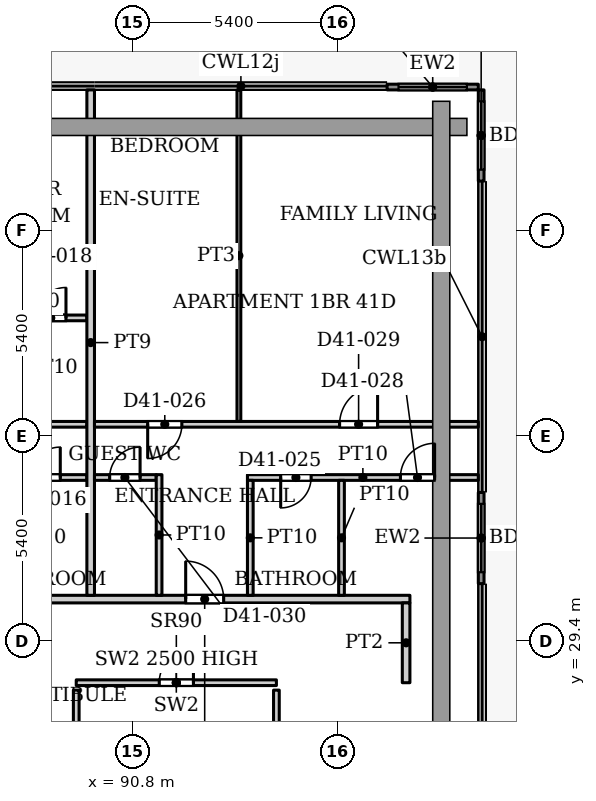
"""IFC4 building model, lengths in metres.
Left out: names, types, materials, properties, quantities, classifications, styles, units other than length and angle.
Written with IfcOpenShell. Run it as: python <this file> out.ifc"""

import sys

from ifc_helpers import new_model, si_unit, direction, frame, frame_2d, origin, place, context, subcontext, project, spatial, rectangle, extrude, source, transform, mapped, element, fill, save


model = new_model("IFC4")
c1 = context("Model", 3, precision=1e-05, world=origin(), true_north=direction((0.0, 1.0)))
c2 = subcontext(c1, "Body", "Model", "MODEL_VIEW")
j1 = project(units=[si_unit("LENGTHUNIT", "METRE"), si_unit("PLANEANGLEUNIT", "RADIAN")], contexts=[c1])
p1 = place(None, origin())
s1 = spatial("IfcSite", under=j1, at=p1, CompositionType="ELEMENT")
p2 = place(p1, origin())
s2 = spatial("IfcBuilding", under=s1, at=p2, CompositionType="ELEMENT")
p3 = place(p2, frame((0.0, 0.0, 176.0)))
s3 = spatial("IfcBuildingStorey", under=s2, at=p3, CompositionType="ELEMENT", Elevation=176.0)
p4 = place(p3, frame((97.5, 43.975, 0.0), z_axis=(0.0, 0.0, 1.0), x_axis=(1.0, 0.0, 0.0)))
e1 = element("IfcWall", 1, at=p4, inside=s3, PredefinedType="SOLIDWALL", context=c2, shape_type="SweptSolid", body=[
    extrude(rectangle(XDim=2.4, YDim=0.15, at=frame_2d((1.2, 0.0))), origin(), (0.0, 0.0, 1.0), 3.75),
])
p5 = place(p4, frame((0.3, 0.0, 0.0)))
e2 = element("IfcOpeningElement", 2, at=p5, cuts=e1, PredefinedType="OPENING", context=c2, shape_type="SweptSolid", body=[
    extrude(rectangle(XDim=1.8, YDim=2.4, at=frame_2d((0.9, 1.2))), frame((0.0, 0.085, 0.0), z_axis=(0.0, -1.0, 0.0), x_axis=(1.0, 0.0, 0.0)), (0.0, 0.0, 1.0), 0.17),
])
p6 = place(p3, frame((99.975, 43.9, 0.0), z_axis=(0.0, 0.0, 1.0), x_axis=(0.0, -1.0, 0.0)))
e3 = element("IfcWall", 3, at=p6, inside=s3, PredefinedType="SOLIDWALL", context=c2, shape_type="SweptSolid", body=[
    extrude(rectangle(XDim=2.4, YDim=0.15, at=frame_2d((1.2, 0.0))), origin(), (0.0, 0.0, 1.0), 3.75),
])
p7 = place(p6, frame((0.3, 0.0, 0.0)))
e4 = element("IfcOpeningElement", 4, at=p7, cuts=e3, PredefinedType="OPENING", context=c2, shape_type="SweptSolid", body=[
    extrude(rectangle(XDim=1.8, YDim=2.4, at=frame_2d((0.9, 1.2))), frame((0.0, 0.085, 0.0), z_axis=(0.0, -1.0, 0.0), x_axis=(1.0, 0.0, 0.0)), (0.0, 0.0, 1.0), 0.17),
])
p8 = place(p3, frame((99.975, 33.307, 0.0), z_axis=(0.0, 0.0, 1.0), x_axis=(0.0, -1.0, 0.0)))
e5 = element("IfcWall", 5, at=p8, inside=s3, PredefinedType="SOLIDWALL", context=c2, shape_type="SweptSolid", body=[
    extrude(rectangle(XDim=2.4, YDim=0.15, at=frame_2d((1.2, 0.0))), origin(), (0.0, 0.0, 1.0), 3.75),
])
p9 = place(p8, frame((0.3, 0.0, 0.0)))
e6 = element("IfcOpeningElement", 6, at=p9, cuts=e5, PredefinedType="OPENING", context=c2, shape_type="SweptSolid", body=[
    extrude(rectangle(XDim=1.8, YDim=2.4, at=frame_2d((0.9, 1.2))), frame((0.0, 0.085, 0.0), z_axis=(0.0, -1.0, 0.0), x_axis=(1.0, 0.0, 0.0)), (0.0, 0.0, 1.0), 0.17),
])
p10 = place(p3, frame((89.32, 28.3, 0.0), z_axis=(0.0, 0.0, 1.0), x_axis=(1.0, 0.0, 0.0)))
e7 = element("IfcWall", 7, at=p10, inside=s3, PredefinedType="PARTITIONING", context=c2, shape_type="SweptSolid", body=[
    extrude(rectangle(XDim=5.267, YDim=0.15, at=frame_2d((2.633, 0.0))), origin(), (0.0, 0.0, 1.0), 2.5),
])
p11 = place(p10, frame((2.184, 0.0, 0.0)))
e8 = element("IfcOpeningElement", 8, at=p11, cuts=e7, PredefinedType="OPENING", context=c2, shape_type="SweptSolid", body=[
    extrude(rectangle(XDim=0.9, YDim=2.2, at=frame_2d((0.45, 1.1))), frame((0.0, 0.085, 0.0), z_axis=(0.0, -1.0, 0.0), x_axis=(1.0, 0.0, 0.0)), (0.0, 0.0, 1.0), 0.17),
])
p12 = place(p3, frame((89.32, 25.62, 0.0), z_axis=(0.0, 0.0, 1.0), x_axis=(0.0, 1.0, 0.0)))
e9 = element("IfcWall", 9, at=p12, inside=s3, PredefinedType="PARTITIONING", context=c2, shape_type="SweptSolid", body=[
    extrude(rectangle(XDim=2.485, YDim=0.15, at=frame_2d((1.242, 0.0))), origin(), (0.0, 0.0, 1.0), 3.9),
])
p13 = place(p3, frame((94.587, 21.293, 0.0), z_axis=(0.0, 0.0, 1.0), x_axis=(0.0, 1.0, 0.0)))
e10 = element("IfcWall", 10, at=p13, inside=s3, PredefinedType="PARTITIONING", context=c2, shape_type="SweptSolid", body=[
    extrude(rectangle(XDim=6.812, YDim=0.15, at=frame_2d((3.406, 0.0))), origin(), (0.0, 0.0, 1.0), 3.9),
])
p14 = place(p3, frame((53.549, 30.5, 0.0), z_axis=(0.0, 0.0, 1.0), x_axis=(1.0, 0.0, 0.0)))
e11 = element("IfcWall", 11, at=p14, inside=s3, PredefinedType="PARTITIONING", context=c2, shape_type="SweptSolid", body=[
    extrude(rectangle(XDim=44.551, YDim=0.2, at=frame_2d((22.275, 0.0))), origin(), (0.0, 0.0, 1.0), 3.6),
])
p15 = place(p14, frame((6.851, 0.0, 0.0)))
e12 = element("IfcOpeningElement", 12, at=p15, cuts=e11, PredefinedType="OPENING", context=c2, shape_type="SweptSolid", body=[
    extrude(rectangle(XDim=1.0, YDim=2.1, at=frame_2d((0.5, 1.05))), frame((0.0, 0.11, 0.0), z_axis=(0.0, -1.0, 0.0), x_axis=(1.0, 0.0, 0.0)), (0.0, 0.0, 1.0), 0.22),
])
p16 = place(p14, frame((13.451, 0.0, 0.0)))
e13 = element("IfcOpeningElement", 13, at=p16, cuts=e11, PredefinedType="OPENING", context=c2, shape_type="SweptSolid", body=[
    extrude(rectangle(XDim=1.0, YDim=2.1, at=frame_2d((0.5, 1.05))), frame((0.0, 0.11, 0.0), z_axis=(0.0, -1.0, 0.0), x_axis=(1.0, 0.0, 0.0)), (0.0, 0.0, 1.0), 0.22),
])
p17 = place(p14, frame((24.701, 0.0, 0.0)))
e14 = element("IfcOpeningElement", 14, at=p17, cuts=e11, PredefinedType="OPENING", context=c2, shape_type="SweptSolid", body=[
    extrude(rectangle(XDim=1.0, YDim=2.1, at=frame_2d((0.5, 1.05))), frame((0.0, 0.11, 0.0), z_axis=(0.0, -1.0, 0.0), x_axis=(1.0, 0.0, 0.0)), (0.0, 0.0, 1.0), 0.22),
])
p18 = place(p14, frame((38.651, 0.0, 0.0)))
e15 = element("IfcOpeningElement", 15, at=p18, cuts=e11, PredefinedType="OPENING", context=c2, shape_type="SweptSolid", body=[
    extrude(rectangle(XDim=1.0, YDim=2.1, at=frame_2d((0.5, 1.05))), frame((0.0, 0.11, 0.0), z_axis=(0.0, -1.0, 0.0), x_axis=(1.0, 0.0, 0.0)), (0.0, 0.0, 1.0), 0.22),
])
p19 = place(p3, frame((77.8, 35.1, 0.0), z_axis=(0.0, 0.0, 1.0), x_axis=(1.0, 0.0, 0.0)))
e16 = element("IfcWall", 16, at=p19, inside=s3, PredefinedType="PARTITIONING", context=c2, shape_type="SweptSolid", body=[
    extrude(rectangle(XDim=11.8, YDim=0.15, at=frame_2d((5.9, 0.0))), origin(), (0.0, 0.0, 1.0), 3.6),
])
p20 = place(p19, frame((5.6, 0.0, 0.0)))
e17 = element("IfcOpeningElement", 17, at=p20, cuts=e16, PredefinedType="OPENING", context=c2, shape_type="SweptSolid", body=[
    extrude(rectangle(XDim=0.9, YDim=2.1, at=frame_2d((0.45, 1.05))), frame((0.0, 0.085, 0.0), z_axis=(0.0, -1.0, 0.0), x_axis=(1.0, 0.0, 0.0)), (0.0, 0.0, 1.0), 0.17),
])
p21 = place(p19, frame((1.5, 0.0, 0.0)))
e18 = element("IfcOpeningElement", 18, at=p21, cuts=e16, PredefinedType="OPENING", context=c2, shape_type="SweptSolid", body=[
    extrude(rectangle(XDim=1.0, YDim=2.1, at=frame_2d((0.5, 1.05))), frame((0.0, 0.085, 0.0), z_axis=(0.0, -1.0, 0.0), x_axis=(1.0, 0.0, 0.0)), (0.0, 0.0, 1.0), 0.17),
])
p22 = place(p19, frame((8.45, 0.0, 0.0)))
e19 = element("IfcOpeningElement", 19, at=p22, cuts=e16, PredefinedType="OPENING", context=c2, shape_type="SweptSolid", body=[
    extrude(rectangle(XDim=0.9, YDim=2.1, at=frame_2d((0.45, 1.05))), frame((0.0, 0.085, 0.0), z_axis=(0.0, -1.0, 0.0), x_axis=(1.0, 0.0, 0.0)), (0.0, 0.0, 1.0), 0.17),
])
p23 = place(p3, frame((79.725, 33.7, 0.0), z_axis=(0.0, 0.0, 1.0), x_axis=(1.0, 0.0, 0.0)))
e20 = element("IfcWall", 20, at=p23, inside=s3, PredefinedType="PARTITIONING", context=c2, shape_type="SweptSolid", body=[
    extrude(rectangle(XDim=9.875, YDim=0.15, at=frame_2d((4.938, 0.0))), origin(), (0.0, 0.0, 1.0), 3.6),
])
p24 = place(p23, frame((8.375, 0.0, 0.0)))
e21 = element("IfcOpeningElement", 21, at=p24, cuts=e20, PredefinedType="OPENING", context=c2, shape_type="SweptSolid", body=[
    extrude(rectangle(XDim=0.8, YDim=2.1, at=frame_2d((0.4, 1.05))), frame((0.0, 0.085, 0.0), z_axis=(0.0, -1.0, 0.0), x_axis=(1.0, 0.0, 0.0)), (0.0, 0.0, 1.0), 0.17),
])
p25 = place(p23, frame((5.325, 0.0, 0.0)))
e22 = element("IfcOpeningElement", 22, at=p25, cuts=e20, PredefinedType="OPENING", context=c2, shape_type="SweptSolid", body=[
    extrude(rectangle(XDim=0.9, YDim=2.1, at=frame_2d((0.45, 1.05))), frame((0.0, 0.085, 0.0), z_axis=(0.0, -1.0, 0.0), x_axis=(1.0, 0.0, 0.0)), (0.0, 0.0, 1.0), 0.17),
])
p26 = place(p23, frame((0.725, 0.0, 0.0)))
e23 = element("IfcOpeningElement", 23, at=p26, cuts=e20, PredefinedType="OPENING", context=c2, shape_type="SweptSolid", body=[
    extrude(rectangle(XDim=0.8, YDim=2.1, at=frame_2d((0.4, 1.05))), frame((0.0, 0.085, 0.0), z_axis=(0.0, -1.0, 0.0), x_axis=(1.0, 0.0, 0.0)), (0.0, 0.0, 1.0), 0.17),
])
p27 = place(p23, frame((2.675, 0.0, 0.0)))
e24 = element("IfcOpeningElement", 24, at=p27, cuts=e20, PredefinedType="OPENING", context=c2, shape_type="SweptSolid", body=[
    extrude(rectangle(XDim=0.8, YDim=2.1, at=frame_2d((0.4, 1.05))), frame((0.0, 0.085, 0.0), z_axis=(0.0, -1.0, 0.0), x_axis=(1.0, 0.0, 0.0)), (0.0, 0.0, 1.0), 0.17),
])
p28 = place(p3, frame((87.675, 37.9, 0.0), z_axis=(0.0, 0.0, 1.0), x_axis=(1.0, 0.0, 0.0)))
e25 = element("IfcWall", 25, at=p28, inside=s3, PredefinedType="PARTITIONING", context=c2, shape_type="SweptSolid", body=[
    extrude(rectangle(XDim=1.925, YDim=0.15, at=frame_2d((0.962, 0.0))), origin(), (0.0, 0.0, 1.0), 3.6),
])
p29 = place(p28, frame((0.575, 0.0, 0.0)))
e26 = element("IfcOpeningElement", 26, at=p29, cuts=e25, PredefinedType="OPENING", context=c2, shape_type="SweptSolid", body=[
    extrude(rectangle(XDim=0.8, YDim=2.1, at=frame_2d((0.4, 1.05))), frame((0.0, 0.085, 0.0), z_axis=(0.0, -1.0, 0.0), x_axis=(1.0, 0.0, 0.0)), (0.0, 0.0, 1.0), 0.17),
])
p30 = place(p3, frame((89.7, 30.6, 0.0), z_axis=(0.0, 0.0, 1.0), x_axis=(0.0, 1.0, 0.0)))
e27 = element("IfcWall", 27, at=p30, inside=s3, PredefinedType="PARTITIONING", context=c2, shape_type="SweptSolid", body=[
    extrude(rectangle(XDim=13.3, YDim=0.2, at=frame_2d((6.65, 0.0))), origin(), (0.0, 0.0, 1.0), 3.6),
])
p31 = place(p3, frame((89.8, 33.7, 0.0), z_axis=(0.0, 0.0, 1.0), x_axis=(1.0, 0.0, 0.0)))
e28 = element("IfcWall", 28, at=p31, inside=s3, PredefinedType="PARTITIONING", context=c2, shape_type="SweptSolid", body=[
    extrude(rectangle(XDim=1.625, YDim=0.15, at=frame_2d((0.812, 0.0))), origin(), (0.0, 0.0, 1.0), 3.6),
])
p32 = place(p31, frame((0.4, 0.0, 0.0)))
e29 = element("IfcOpeningElement", 29, at=p32, cuts=e28, PredefinedType="OPENING", context=c2, shape_type="SweptSolid", body=[
    extrude(rectangle(XDim=0.8, YDim=2.1, at=frame_2d((0.4, 1.05))), frame((0.0, 0.085, 0.0), z_axis=(0.0, -1.0, 0.0), x_axis=(1.0, 0.0, 0.0)), (0.0, 0.0, 1.0), 0.17),
])
p33 = place(p3, frame((89.8, 35.1, 0.0), z_axis=(0.0, 0.0, 1.0), x_axis=(1.0, 0.0, 0.0)))
e30 = element("IfcWall", 30, at=p33, inside=s3, PredefinedType="PARTITIONING", context=c2, shape_type="SweptSolid", body=[
    extrude(rectangle(XDim=10.1, YDim=0.15, at=frame_2d((5.05, 0.0))), origin(), (0.0, 0.0, 1.0), 3.6),
])
p34 = place(p33, frame((1.4, 0.0, 0.0)))
e31 = element("IfcOpeningElement", 31, at=p34, cuts=e30, PredefinedType="OPENING", context=c2, shape_type="SweptSolid", body=[
    extrude(rectangle(XDim=0.9, YDim=2.1, at=frame_2d((0.45, 1.05))), frame((0.0, 0.085, 0.0), z_axis=(0.0, -1.0, 0.0), x_axis=(1.0, 0.0, 0.0)), (0.0, 0.0, 1.0), 0.17),
])
p35 = place(p33, frame((6.45, 0.0, 0.0)))
e32 = element("IfcOpeningElement", 32, at=p35, cuts=e30, PredefinedType="OPENING", context=c2, shape_type="SweptSolid", body=[
    extrude(rectangle(XDim=1.0, YDim=2.1, at=frame_2d((0.5, 1.05))), frame((0.0, 0.085, 0.0), z_axis=(0.0, -1.0, 0.0), x_axis=(1.0, 0.0, 0.0)), (0.0, 0.0, 1.0), 0.17),
])
p36 = place(p3, frame((91.5, 30.6, 0.0), z_axis=(0.0, 0.0, 1.0), x_axis=(0.0, 1.0, 0.0)))
e33 = element("IfcWall", 33, at=p36, inside=s3, PredefinedType="PARTITIONING", context=c2, shape_type="SweptSolid", body=[
    extrude(rectangle(XDim=3.175, YDim=0.15, at=frame_2d((1.587, 0.0))), origin(), (0.0, 0.0, 1.0), 3.6),
])
p37 = place(p3, frame((93.6, 35.175, 0.0), z_axis=(0.0, 0.0, 1.0), x_axis=(0.0, 1.0, 0.0)))
e34 = element("IfcWall", 34, at=p37, inside=s3, PredefinedType="PARTITIONING", context=c2, shape_type="SweptSolid", body=[
    extrude(rectangle(XDim=8.725, YDim=0.1, at=frame_2d((4.362, 0.0))), origin(), (0.0, 0.0, 1.0), 3.6),
])
p38 = place(p3, frame((93.825, 33.7, 0.0), z_axis=(0.0, 0.0, 1.0), x_axis=(1.0, 0.0, 0.0)))
e35 = element("IfcWall", 35, at=p38, inside=s3, PredefinedType="PARTITIONING", context=c2, shape_type="SweptSolid", body=[
    extrude(rectangle(XDim=6.075, YDim=0.15, at=frame_2d((3.038, 0.0))), origin(), (0.0, 0.0, 1.0), 3.6),
])
p39 = place(p38, frame((0.875, 0.0, 0.0)))
e36 = element("IfcOpeningElement", 36, at=p39, cuts=e35, PredefinedType="OPENING", context=c2, shape_type="SweptSolid", body=[
    extrude(rectangle(XDim=0.8, YDim=2.1, at=frame_2d((0.4, 1.05))), frame((0.0, 0.085, 0.0), z_axis=(0.0, -1.0, 0.0), x_axis=(1.0, 0.0, 0.0)), (0.0, 0.0, 1.0), 0.17),
])
p40 = place(p38, frame((4.025, 0.0, 0.0)))
e37 = element("IfcOpeningElement", 37, at=p40, cuts=e35, PredefinedType="OPENING", context=c2, shape_type="SweptSolid", body=[
    extrude(rectangle(XDim=0.9, YDim=2.1, at=frame_2d((0.45, 1.05))), frame((0.0, 0.085, 0.0), z_axis=(0.0, -1.0, 0.0), x_axis=(1.0, 0.0, 0.0)), (0.0, 0.0, 1.0), 0.17),
])
for number, where, z_axis, x_axis in (
    (38, (93.9, 30.6, 0.0), (0.0, 0.0, 1.0), (0.0, 1.0, 0.0)),
    (39, (96.3, 30.6, 0.0), (0.0, 0.0, 1.0), (0.0, 1.0, 0.0)),
):
    element("IfcWall", number, at=place(p3, frame(where, z_axis=z_axis, x_axis=x_axis)), inside=s3, PredefinedType="PARTITIONING", context=c2, shape_type="SweptSolid", body=[
        extrude(rectangle(XDim=3.025, YDim=0.15, at=frame_2d((1.512, 0.0))), origin(), (0.0, 0.0, 1.0), 3.6),
    ])
p41 = place(p3, frame((98.0, 28.3, 0.0), z_axis=(0.0, 0.0, 1.0), x_axis=(0.0, 1.0, 0.0)))
e40 = element("IfcWall", 40, at=p41, inside=s3, PredefinedType="PARTITIONING", context=c2, shape_type="SweptSolid", body=[
    extrude(rectangle(XDim=2.1, YDim=0.2, at=frame_2d((1.05, 0.0))), origin(), (0.0, 0.0, 1.0), 3.6),
])
m1 = source(origin(), c2, "Body", "SweptSolid", [
    extrude(rectangle(XDim=1.8, YDim=2.4, at=frame_2d((0.9, 1.2))), frame((0.0, 0.025, 0.0), z_axis=(0.0, -1.0, 0.0), x_axis=(1.0, 0.0, 0.0)), (0.0, 0.0, 1.0), 0.05),
])
p42 = place(p5, origin())
e41 = element("IfcDoor", 41, at=p42, inside=s3, OperationType="SLIDING_TO_LEFT", PredefinedType="DOOR", context=c2, shape_type="MappedRepresentation", body=[
    mapped(m1, transform((0.0, 0.0, 0.0), x_axis=(1.0, 0.0, 0.0), y_axis=(0.0, 1.0, 0.0), z_axis=(0.0, 0.0, 1.0), scale=1.0)),
])
fill(e2, e41)
p43 = place(p7, origin())
e42 = element("IfcDoor", 42, at=p43, inside=s3, OperationType="SLIDING_TO_LEFT", PredefinedType="DOOR", context=c2, shape_type="MappedRepresentation", body=[
    mapped(m1, transform((0.0, 0.0, 0.0), x_axis=(1.0, 0.0, 0.0), y_axis=(0.0, 1.0, 0.0), z_axis=(0.0, 0.0, 1.0), scale=1.0)),
])
fill(e4, e42)
p44 = place(p9, origin())
e43 = element("IfcDoor", 43, at=p44, inside=s3, OperationType="SLIDING_TO_LEFT", PredefinedType="DOOR", context=c2, shape_type="MappedRepresentation", body=[
    mapped(m1, transform((0.0, 0.0, 0.0), x_axis=(1.0, 0.0, 0.0), y_axis=(0.0, 1.0, 0.0), z_axis=(0.0, 0.0, 1.0), scale=1.0)),
])
fill(e6, e43)
m2 = source(origin(), c2, "Body", "SweptSolid", [
    extrude(rectangle(XDim=0.9, YDim=2.2, at=frame_2d((0.45, 1.1))), frame((0.0, 0.025, 0.0), z_axis=(0.0, -1.0, 0.0), x_axis=(1.0, 0.0, 0.0)), (0.0, 0.0, 1.0), 0.05),
])
p45 = place(p11, origin())
e44 = element("IfcDoor", 44, at=p45, inside=s3, OperationType="SINGLE_SWING_LEFT", PredefinedType="DOOR", context=c2, shape_type="MappedRepresentation", body=[
    mapped(m2, transform((0.0, 0.0, 0.0), x_axis=(1.0, 0.0, 0.0), y_axis=(0.0, 1.0, 0.0), z_axis=(0.0, 0.0, 1.0), scale=1.0)),
])
fill(e8, e44)
m3 = source(origin(), c2, "Body", "SweptSolid", [
    extrude(rectangle(XDim=0.8, YDim=2.1, at=frame_2d((0.4, 1.05))), frame((0.0, 0.025, 0.0), z_axis=(0.0, -1.0, 0.0), x_axis=(1.0, 0.0, 0.0)), (0.0, 0.0, 1.0), 0.05),
])
p46 = place(p24, origin())
e45 = element("IfcDoor", 45, at=p46, inside=s3, OperationType="SINGLE_SWING_LEFT", PredefinedType="DOOR", context=c2, shape_type="MappedRepresentation", body=[
    mapped(m3, transform((0.0, 0.0, 0.0), x_axis=(1.0, 0.0, 0.0), y_axis=(0.0, 1.0, 0.0), z_axis=(0.0, 0.0, 1.0), scale=1.0)),
])
fill(e21, e45)
p47 = place(p29, origin())
e46 = element("IfcDoor", 46, at=p47, inside=s3, OperationType="SINGLE_SWING_LEFT", PredefinedType="DOOR", context=c2, shape_type="MappedRepresentation", body=[
    mapped(m3, transform((0.0, 0.0, 0.0), x_axis=(1.0, 0.0, 0.0), y_axis=(0.0, 1.0, 0.0), z_axis=(0.0, 0.0, 1.0), scale=1.0)),
])
fill(e26, e46)
p48 = place(p39, origin())
e47 = element("IfcDoor", 47, at=p48, inside=s3, OperationType="SINGLE_SWING_RIGHT", PredefinedType="DOOR", context=c2, shape_type="MappedRepresentation", body=[
    mapped(m3, transform((0.0, 0.0, 0.0), x_axis=(1.0, 0.0, 0.0), y_axis=(0.0, 1.0, 0.0), z_axis=(0.0, 0.0, 1.0), scale=1.0)),
])
fill(e36, e47)
m4 = source(origin(), c2, "Body", "SweptSolid", [
    extrude(rectangle(XDim=0.9, YDim=2.1, at=frame_2d((0.45, 1.05))), frame((0.0, 0.025, 0.0), z_axis=(0.0, -1.0, 0.0), x_axis=(1.0, 0.0, 0.0)), (0.0, 0.0, 1.0), 0.05),
])
p49 = place(p34, origin())
e48 = element("IfcDoor", 48, at=p49, inside=s3, OperationType="SINGLE_SWING_RIGHT", PredefinedType="DOOR", context=c2, shape_type="MappedRepresentation", body=[
    mapped(m4, transform((0.0, 0.0, 0.0), x_axis=(1.0, 0.0, 0.0), y_axis=(0.0, 1.0, 0.0), z_axis=(0.0, 0.0, 1.0), scale=1.0)),
])
fill(e31, e48)
m5 = source(origin(), c2, "Body", "SweptSolid", [
    extrude(rectangle(XDim=1.0, YDim=2.1, at=frame_2d((0.5, 1.05))), frame((0.0, 0.025, 0.0), z_axis=(0.0, -1.0, 0.0), x_axis=(1.0, 0.0, 0.0)), (0.0, 0.0, 1.0), 0.05),
])
p50 = place(p18, origin())
e49 = element("IfcDoor", 49, at=p50, inside=s3, OperationType="SINGLE_SWING_LEFT", PredefinedType="DOOR", context=c2, shape_type="MappedRepresentation", body=[
    mapped(m5, transform((0.0, 0.0, 0.0), x_axis=(1.0, 0.0, 0.0), y_axis=(0.0, 1.0, 0.0), z_axis=(0.0, 0.0, 1.0), scale=1.0)),
])
fill(e15, e49)
p51 = place(p40, origin())
e50 = element("IfcDoor", 50, at=p51, inside=s3, OperationType="SINGLE_SWING_LEFT", PredefinedType="DOOR", context=c2, shape_type="MappedRepresentation", body=[
    mapped(m4, transform((0.0, 0.0, 0.0), x_axis=(1.0, 0.0, 0.0), y_axis=(0.0, 1.0, 0.0), z_axis=(0.0, 0.0, 1.0), scale=1.0)),
])
fill(e37, e50)
m6 = source(origin(), c2, "Body", "SweptSolid", [
    extrude(rectangle(XDim=1.0, YDim=2.1, at=frame_2d((0.5, 1.05))), frame((0.0, 0.025, 0.0), z_axis=(0.0, -1.0, 0.0), x_axis=(1.0, 0.0, 0.0)), (0.0, 0.0, 1.0), 0.05),
])
p52 = place(p35, origin())
e51 = element("IfcDoor", 51, at=p52, inside=s3, OperationType="SINGLE_SWING_LEFT", PredefinedType="DOOR", context=c2, shape_type="MappedRepresentation", body=[
    mapped(m6, transform((0.0, 0.0, 0.0), x_axis=(1.0, 0.0, 0.0), y_axis=(0.0, 1.0, 0.0), z_axis=(0.0, 0.0, 1.0), scale=1.0)),
])
fill(e32, e51)
p53 = place(p32, origin())
e52 = element("IfcDoor", 52, at=p53, inside=s3, OperationType="SINGLE_SWING_LEFT", PredefinedType="DOOR", context=c2, shape_type="MappedRepresentation", body=[
    mapped(m3, transform((0.0, 0.0, 0.0), x_axis=(1.0, 0.0, 0.0), y_axis=(0.0, 1.0, 0.0), z_axis=(0.0, 0.0, 1.0), scale=1.0)),
])
fill(e29, e52)
save(model, sys.argv[1])
